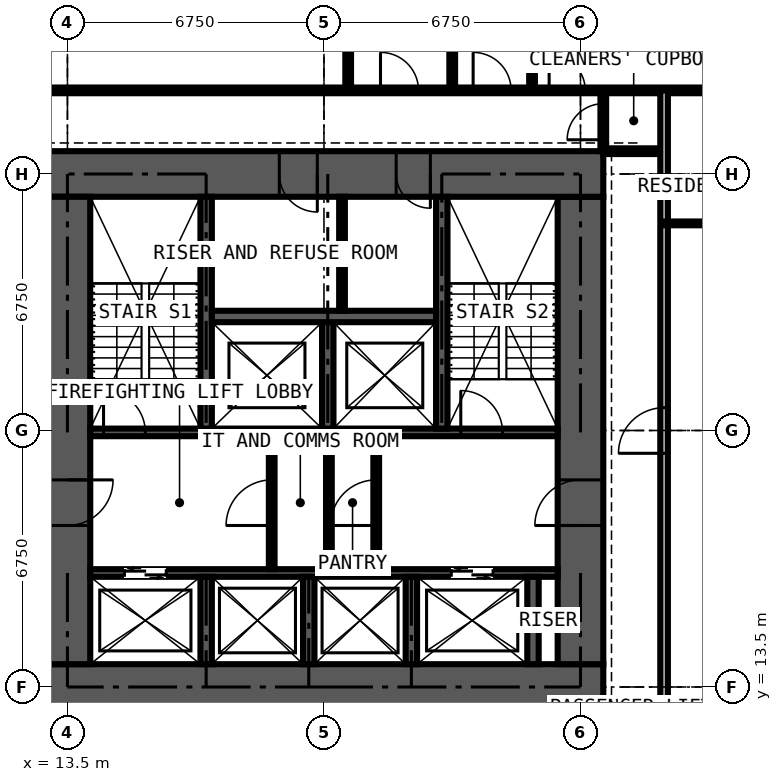
"""IFC4 building model, lengths in metres.
Left out: names, types, materials, properties, quantities, classifications, styles, units other than length and angle.
Written with IfcOpenShell. Run it as: python <this file> out.ifc"""

import sys

from ifc_helpers import new_model, si_unit, direction, frame, frame_2d, origin, place, context, subcontext, project, spatial, rectangle, extrude, element, fill, save


model = new_model("IFC4")
c1 = context("Model", 3, precision=1e-05, world=origin(), true_north=direction((0.0, 1.0)))
c2 = subcontext(c1, "Body", "Model", "MODEL_VIEW")
j1 = project(units=[si_unit("LENGTHUNIT", "METRE"), si_unit("PLANEANGLEUNIT", "RADIAN")], contexts=[c1])
p1 = place(None, origin())
s1 = spatial("IfcSite", under=j1, at=p1, CompositionType="ELEMENT")
p2 = place(p1, origin())
s2 = spatial("IfcBuilding", under=s1, at=p2, CompositionType="ELEMENT")
p3 = place(p2, frame((0.0, 0.0, 21.6)))
s3 = spatial("IfcBuildingStorey", under=s2, at=p3, CompositionType="ELEMENT", Elevation=21.6)
p4 = place(p3, frame((12.9, 13.5, 0.0), z_axis=(0.0, 0.0, 1.0), x_axis=(1.0, 0.0, 0.0)))
e1 = element("IfcWall", 1, at=p4, inside=s3, PredefinedType="SHEAR", context=c2, shape_type="SweptSolid", body=[
    extrude(rectangle(XDim=14.7, YDim=1.2, at=frame_2d((7.35, 0.0))), origin(), (0.0, 0.0, 1.0), 3.6),
])
p5 = place(p3, frame((27.0, 14.1, 0.0), z_axis=(0.0, 0.0, 1.0), x_axis=(0.0, 1.0, 0.0)))
e2 = element("IfcWall", 2, at=p5, inside=s3, PredefinedType="SHEAR", context=c2, shape_type="SweptSolid", body=[
    extrude(rectangle(XDim=12.3, YDim=1.2, at=frame_2d((6.15, 0.0))), origin(), (0.0, 0.0, 1.0), 3.6),
])
p6 = place(p5, frame((3.65, 0.0, 0.0)))
e3 = element("IfcOpeningElement", 3, at=p6, cuts=e2, PredefinedType="OPENING", context=c2, shape_type="SweptSolid", body=[
    extrude(rectangle(XDim=1.2, YDim=2.2, at=frame_2d((0.6, 1.1))), frame((0.0, 0.61, 0.0), z_axis=(0.0, -1.0, 0.0), x_axis=(1.0, 0.0, 0.0)), (0.0, 0.0, 1.0), 1.22),
])
p7 = place(p3, frame((27.6, 27.0, 0.0), z_axis=(0.0, 0.0, 1.0), x_axis=(-1.0, 0.0, 0.0)))
e4 = element("IfcWall", 4, at=p7, inside=s3, PredefinedType="SHEAR", context=c2, shape_type="SweptSolid", body=[
    extrude(rectangle(XDim=14.7, YDim=1.2, at=frame_2d((7.35, 0.0))), origin(), (0.0, 0.0, 1.0), 3.6),
])
p8 = place(p7, frame((4.55, 0.0, 0.0)))
e5 = element("IfcOpeningElement", 5, at=p8, cuts=e4, PredefinedType="OPENING", context=c2, shape_type="SweptSolid", body=[
    extrude(rectangle(XDim=0.9, YDim=2.2, at=frame_2d((0.45, 1.1))), frame((0.0, 0.61, 0.0), z_axis=(0.0, -1.0, 0.0), x_axis=(1.0, 0.0, 0.0)), (0.0, 0.0, 1.0), 1.22),
])
p9 = place(p7, frame((7.525, 0.0, 0.0)))
e6 = element("IfcOpeningElement", 6, at=p9, cuts=e4, PredefinedType="OPENING", context=c2, shape_type="SweptSolid", body=[
    extrude(rectangle(XDim=1.0, YDim=2.2, at=frame_2d((0.5, 1.1))), frame((0.0, 0.61, 0.0), z_axis=(0.0, -1.0, 0.0), x_axis=(1.0, 0.0, 0.0)), (0.0, 0.0, 1.0), 1.22),
])
p10 = place(p3, frame((13.5, 26.4, 0.0), z_axis=(0.0, 0.0, 1.0), x_axis=(0.0, -1.0, 0.0)))
e7 = element("IfcWall", 7, at=p10, inside=s3, PredefinedType="SHEAR", context=c2, shape_type="SweptSolid", body=[
    extrude(rectangle(XDim=12.3, YDim=1.2, at=frame_2d((6.15, 0.0))), origin(), (0.0, 0.0, 1.0), 3.6),
])
p11 = place(p10, frame((7.45, 0.0, 0.0)))
e8 = element("IfcOpeningElement", 8, at=p11, cuts=e7, PredefinedType="OPENING", context=c2, shape_type="SweptSolid", body=[
    extrude(rectangle(XDim=1.2, YDim=2.2, at=frame_2d((0.6, 1.1))), frame((0.0, 0.61, 0.0), z_axis=(0.0, -1.0, 0.0), x_axis=(1.0, 0.0, 0.0)), (0.0, 0.0, 1.0), 1.22),
])
p12 = place(p3, frame((14.1, 16.5, 0.0), z_axis=(0.0, 0.0, 1.0), x_axis=(1.0, 0.0, 0.0)))
e9 = element("IfcWall", 9, at=p12, inside=s3, PredefinedType="SHEAR", context=c2, shape_type="SweptSolid", body=[
    extrude(rectangle(XDim=12.3, YDim=0.2, at=frame_2d((6.15, 0.0))), origin(), (0.0, 0.0, 1.0), 3.6),
])
p13 = place(p12, frame((0.9, 0.0, 0.0)))
e10 = element("IfcOpeningElement", 10, at=p13, cuts=e9, PredefinedType="OPENING", context=c2, shape_type="SweptSolid", body=[
    extrude(rectangle(XDim=1.1, YDim=2.2, at=frame_2d((0.55, 1.1))), frame((0.0, 0.11, 0.0), z_axis=(0.0, -1.0, 0.0), x_axis=(1.0, 0.0, 0.0)), (0.0, 0.0, 1.0), 0.22),
])
p14 = place(p12, frame((9.5, 0.0, 0.0)))
e11 = element("IfcOpeningElement", 11, at=p14, cuts=e9, PredefinedType="OPENING", context=c2, shape_type="SweptSolid", body=[
    extrude(rectangle(XDim=1.1, YDim=2.2, at=frame_2d((0.55, 1.1))), frame((0.0, 0.11, 0.0), z_axis=(0.0, -1.0, 0.0), x_axis=(1.0, 0.0, 0.0)), (0.0, 0.0, 1.0), 0.22),
])
p15 = place(p3, frame((14.1, 20.2, 0.0), z_axis=(0.0, 0.0, 1.0), x_axis=(1.0, 0.0, 0.0)))
e12 = element("IfcWall", 12, at=p15, inside=s3, PredefinedType="SHEAR", context=c2, shape_type="SweptSolid", body=[
    extrude(rectangle(XDim=12.3, YDim=0.2, at=frame_2d((6.15, 0.0))), origin(), (0.0, 0.0, 1.0), 3.6),
])
p16 = place(p15, frame((0.35, 0.0, 0.0)))
e13 = element("IfcOpeningElement", 13, at=p16, cuts=e12, PredefinedType="OPENING", context=c2, shape_type="SweptSolid", body=[
    extrude(rectangle(XDim=1.1, YDim=2.2, at=frame_2d((0.55, 1.1))), frame((0.0, 0.11, 0.0), z_axis=(0.0, -1.0, 0.0), x_axis=(1.0, 0.0, 0.0)), (0.0, 0.0, 1.0), 0.22),
])
p17 = place(p15, frame((9.75, 0.0, 0.0)))
e14 = element("IfcOpeningElement", 14, at=p17, cuts=e12, PredefinedType="OPENING", context=c2, shape_type="SweptSolid", body=[
    extrude(rectangle(XDim=1.1, YDim=2.2, at=frame_2d((0.55, 1.1))), frame((0.0, 0.11, 0.0), z_axis=(0.0, -1.0, 0.0), x_axis=(1.0, 0.0, 0.0)), (0.0, 0.0, 1.0), 0.22),
])
for number, where, z_axis, x_axis in (
    (15, (17.15, 20.3, 0.0), (0.0, 0.0, 1.0), (0.0, 1.0, 0.0)),
    (16, (23.35, 20.3, 0.0), (0.0, 0.0, 1.0), (0.0, 1.0, 0.0)),
):
    element("IfcWall", number, at=place(p3, frame(where, z_axis=z_axis, x_axis=x_axis)), inside=s3, PredefinedType="SHEAR", context=c2, shape_type="SweptSolid", body=[
        extrude(rectangle(XDim=6.1, YDim=0.3, at=frame_2d((3.05, 0.0))), origin(), (0.0, 0.0, 1.0), 3.6),
    ])
p18 = place(p3, frame((20.35, 20.3, 0.0), z_axis=(0.0, 0.0, 1.0), x_axis=(0.0, 1.0, 0.0)))
e17 = element("IfcWall", 17, at=p18, inside=s3, PredefinedType="SHEAR", context=c2, shape_type="SweptSolid", body=[
    extrude(rectangle(XDim=2.8, YDim=0.3, at=frame_2d((1.4, 0.0))), origin(), (0.0, 0.0, 1.0), 3.6),
])
p19 = place(p3, frame((17.3, 23.25, 0.0), z_axis=(0.0, 0.0, 1.0), x_axis=(1.0, 0.0, 0.0)))
e18 = element("IfcWall", 18, at=p19, inside=s3, PredefinedType="SHEAR", context=c2, shape_type="SweptSolid", body=[
    extrude(rectangle(XDim=5.9, YDim=0.3, at=frame_2d((2.95, 0.0))), origin(), (0.0, 0.0, 1.0), 3.6),
])
for number, where, z_axis, x_axis in (
    (19, (17.15, 14.1, 0.0), (0.0, 0.0, 1.0), (0.0, 1.0, 0.0)),
    (20, (19.85, 14.1, 0.0), (0.0, 0.0, 1.0), (0.0, 1.0, 0.0)),
    (21, (22.55, 14.1, 0.0), (0.0, 0.0, 1.0), (0.0, 1.0, 0.0)),
    (22, (25.75, 14.1, 0.0), (0.0, 0.0, 1.0), (0.0, 1.0, 0.0)),
):
    element("IfcWall", number, at=place(p3, frame(where, z_axis=z_axis, x_axis=x_axis)), inside=s3, PredefinedType="SHEAR", context=c2, shape_type="SweptSolid", body=[
        extrude(rectangle(XDim=2.3, YDim=0.3, at=frame_2d((1.15, 0.0))), origin(), (0.0, 0.0, 1.0), 3.6),
    ])
p20 = place(p3, frame((18.875, 16.6, 0.0), z_axis=(0.0, 0.0, 1.0), x_axis=(0.0, 1.0, 0.0)))
e23 = element("IfcWall", 23, at=p20, inside=s3, PredefinedType="PARTITIONING", context=c2, shape_type="SweptSolid", body=[
    extrude(rectangle(XDim=3.5, YDim=0.15, at=frame_2d((1.75, 0.0))), origin(), (0.0, 0.0, 1.0), 3.375),
])
p21 = place(p20, frame((1.15, 0.0, 0.0)))
e24 = element("IfcOpeningElement", 24, at=p21, cuts=e23, PredefinedType="OPENING", context=c2, shape_type="SweptSolid", body=[
    extrude(rectangle(XDim=1.2, YDim=2.2, at=frame_2d((0.6, 1.1))), frame((0.0, 0.085, 0.0), z_axis=(0.0, -1.0, 0.0), x_axis=(1.0, 0.0, 0.0)), (0.0, 0.0, 1.0), 0.17),
])
p22 = place(p3, frame((21.625, 16.6, 0.0), z_axis=(0.0, 0.0, 1.0), x_axis=(0.0, 1.0, 0.0)))
e25 = element("IfcWall", 25, at=p22, inside=s3, PredefinedType="PARTITIONING", context=c2, shape_type="SweptSolid", body=[
    extrude(rectangle(XDim=3.5, YDim=0.15, at=frame_2d((1.75, 0.0))), origin(), (0.0, 0.0, 1.0), 3.375),
])
p23 = place(p22, frame((1.15, 0.0, 0.0)))
e26 = element("IfcOpeningElement", 26, at=p23, cuts=e25, PredefinedType="OPENING", context=c2, shape_type="SweptSolid", body=[
    extrude(rectangle(XDim=1.2, YDim=2.2, at=frame_2d((0.6, 1.1))), frame((0.0, 0.085, 0.0), z_axis=(0.0, -1.0, 0.0), x_axis=(1.0, 0.0, 0.0)), (0.0, 0.0, 1.0), 0.17),
])
p24 = place(p3, frame((20.38, 16.6, 0.0), z_axis=(0.0, 0.0, 1.0), x_axis=(0.0, 1.0, 0.0)))
e27 = element("IfcWall", 27, at=p24, inside=s3, PredefinedType="PARTITIONING", context=c2, shape_type="SweptSolid", body=[
    extrude(rectangle(XDim=3.5, YDim=0.15, at=frame_2d((1.75, 0.0))), origin(), (0.0, 0.0, 1.0), 3.375),
])
p25 = place(p3, frame((20.725, 23.4, 0.0), z_axis=(0.0, 0.0, 1.0), x_axis=(0.0, 1.0, 0.0)))
e28 = element("IfcWall", 28, at=p25, inside=s3, PredefinedType="PARTITIONING", context=c2, shape_type="SweptSolid", body=[
    extrude(rectangle(XDim=3.0, YDim=0.15, at=frame_2d((1.5, 0.0))), origin(), (0.0, 0.0, 1.0), 3.375),
])
p26 = place(p3, frame((11.3, 29.2, 0.0), z_axis=(0.0, 0.0, 1.0), x_axis=(1.0, 0.0, 0.0)))
e29 = element("IfcWall", 29, at=p26, inside=s3, PredefinedType="PARTITIONING", context=c2, shape_type="SweptSolid", body=[
    extrude(rectangle(XDim=19.075, YDim=0.15, at=frame_2d((9.538, 0.0))), origin(), (0.0, 0.0, 1.0), 3.375),
])
p27 = place(p26, frame((12.875, 0.0, 0.0)))
e30 = element("IfcOpeningElement", 30, at=p27, cuts=e29, PredefinedType="OPENING", context=c2, shape_type="SweptSolid", body=[
    extrude(rectangle(XDim=1.0, YDim=2.2, at=frame_2d((0.5, 1.1))), frame((0.0, 0.085, 0.0), z_axis=(0.0, -1.0, 0.0), x_axis=(1.0, 0.0, 0.0)), (0.0, 0.0, 1.0), 0.17),
])
p28 = place(p26, frame((10.438, 0.0, 0.0)))
e31 = element("IfcOpeningElement", 31, at=p28, cuts=e29, PredefinedType="OPENING", context=c2, shape_type="SweptSolid", body=[
    extrude(rectangle(XDim=1.0, YDim=2.2, at=frame_2d((0.5, 1.1))), frame((0.0, 0.085, 0.0), z_axis=(0.0, -1.0, 0.0), x_axis=(1.0, 0.0, 0.0)), (0.0, 0.0, 1.0), 0.17),
])
p29 = place(p26, frame((14.875, 0.0, 0.0)))
e32 = element("IfcOpeningElement", 32, at=p29, cuts=e29, PredefinedType="OPENING", context=c2, shape_type="SweptSolid", body=[
    extrude(rectangle(XDim=0.95, YDim=2.2, at=frame_2d((0.475, 1.1))), frame((0.0, 0.085, 0.0), z_axis=(0.0, -1.0, 0.0), x_axis=(1.0, 0.0, 0.0)), (0.0, 0.0, 1.0), 0.17),
])
p30 = place(p3, frame((20.887, 29.2, 0.0), z_axis=(0.0, 0.0, 1.0), x_axis=(0.0, 1.0, 0.0)))
e33 = element("IfcWall", 33, at=p30, inside=s3, PredefinedType="PARTITIONING", context=c2, shape_type="SweptSolid", body=[
    extrude(rectangle(XDim=5.65, YDim=0.15, at=frame_2d((2.825, 0.0))), origin(), (0.0, 0.0, 1.0), 3.375),
])
p31 = place(p3, frame((23.625, 29.2, 0.0), z_axis=(0.0, 0.0, 1.0), x_axis=(0.0, 1.0, 0.0)))
e34 = element("IfcWall", 34, at=p31, inside=s3, PredefinedType="PARTITIONING", context=c2, shape_type="SweptSolid", body=[
    extrude(rectangle(XDim=12.034, YDim=0.15, at=frame_2d((6.017, 0.0))), origin(), (0.0, 0.0, 1.0), 3.375),
])
p32 = place(p3, frame((25.725, 29.2, 0.0), z_axis=(0.0, 0.0, 1.0), x_axis=(0.0, 1.0, 0.0)))
e35 = element("IfcWall", 35, at=p32, inside=s3, PredefinedType="PARTITIONING", context=c2, shape_type="SweptSolid", body=[
    extrude(rectangle(XDim=5.65, YDim=0.15, at=frame_2d((2.825, 0.0))), origin(), (0.0, 0.0, 1.0), 3.375),
])
p33 = place(p3, frame((27.6, 27.6, 0.0), z_axis=(0.0, 0.0, 1.0), x_axis=(0.0, 1.0, 0.0)))
e36 = element("IfcWall", 36, at=p33, inside=s3, PredefinedType="PARTITIONING", context=c2, shape_type="SweptSolid", body=[
    extrude(rectangle(XDim=1.6, YDim=0.15, at=frame_2d((0.8, 0.0))), origin(), (0.0, 0.0, 1.0), 3.375),
])
p34 = place(p33, frame((0.3, 0.0, 0.0)))
e37 = element("IfcOpeningElement", 37, at=p34, cuts=e36, PredefinedType="OPENING", context=c2, shape_type="SweptSolid", body=[
    extrude(rectangle(XDim=0.95, YDim=2.2, at=frame_2d((0.475, 1.1))), frame((0.0, 0.085, 0.0), z_axis=(0.0, -1.0, 0.0), x_axis=(1.0, 0.0, 0.0)), (0.0, 0.0, 1.0), 0.17),
])
p35 = place(p3, frame((27.6, 27.6, 0.0), z_axis=(0.0, 0.0, 1.0), x_axis=(1.0, 0.0, 0.0)))
e38 = element("IfcWall", 38, at=p35, inside=s3, PredefinedType="PARTITIONING", context=c2, shape_type="SweptSolid", body=[
    extrude(rectangle(XDim=1.6, YDim=0.15, at=frame_2d((0.8, 0.0))), origin(), (0.0, 0.0, 1.0), 2.877),
])
p36 = place(p3, frame((29.2, 11.3, 0.0), z_axis=(0.0, 0.0, 1.0), x_axis=(0.0, 1.0, 0.0)))
e39 = element("IfcWall", 39, at=p36, inside=s3, PredefinedType="PARTITIONING", context=c2, shape_type="SweptSolid", body=[
    extrude(rectangle(XDim=17.9, YDim=0.2, at=frame_2d((8.95, 0.0))), origin(), (0.0, 0.0, 1.0), 3.375),
])
p37 = place(p36, frame((8.35, 0.0, 0.0)))
e40 = element("IfcOpeningElement", 40, at=p37, cuts=e39, PredefinedType="OPENING", context=c2, shape_type="SweptSolid", body=[
    extrude(rectangle(XDim=1.2, YDim=2.2, at=frame_2d((0.6, 1.1))), frame((0.0, 0.11, 0.0), z_axis=(0.0, -1.0, 0.0), x_axis=(1.0, 0.0, 0.0)), (0.0, 0.0, 1.0), 0.22),
])
p38 = place(p3, frame((29.2, 25.7, 0.0), z_axis=(0.0, 0.0, 1.0), x_axis=(1.0, 0.0, 0.0)))
e41 = element("IfcWall", 41, at=p38, inside=s3, PredefinedType="SHEAR", context=c2, shape_type="SweptSolid", body=[
    extrude(rectangle(XDim=3.45, YDim=0.1, at=frame_2d((1.725, 0.0))), origin(), (0.0, 0.0, 1.0), 3.375),
])
p39 = place(p13, origin())
e42 = element("IfcDoor", 42, at=p39, inside=s3, OperationType="DOUBLE_DOOR_SLIDING", PredefinedType="DOOR", context=c2, shape_type="SweptSolid", body=[
    extrude(rectangle(XDim=1.1, YDim=2.2, at=frame_2d((0.55, 1.1))), frame((0.0, 0.025, 0.0), z_axis=(0.0, -1.0, 0.0), x_axis=(1.0, 0.0, 0.0)), (0.0, 0.0, 1.0), 0.05),
])
fill(e10, e42)
p40 = place(p14, origin())
e43 = element("IfcDoor", 43, at=p40, inside=s3, OperationType="DOUBLE_DOOR_SLIDING", PredefinedType="DOOR", context=c2, shape_type="SweptSolid", body=[
    extrude(rectangle(XDim=1.1, YDim=2.2, at=frame_2d((0.55, 1.1))), frame((0.0, 0.025, 0.0), z_axis=(0.0, -1.0, 0.0), x_axis=(1.0, 0.0, 0.0)), (0.0, 0.0, 1.0), 0.05),
])
fill(e11, e43)
p41 = place(p11, origin())
e44 = element("IfcDoor", 44, at=p41, inside=s3, OperationType="DOUBLE_DOOR_SINGLE_SWING", PredefinedType="DOOR", context=c2, shape_type="SweptSolid", body=[
    extrude(rectangle(XDim=1.2, YDim=2.2, at=frame_2d((0.6, 1.1))), frame((0.0, 0.025, 0.0), z_axis=(0.0, -1.0, 0.0), x_axis=(1.0, 0.0, 0.0)), (0.0, 0.0, 1.0), 0.05),
])
fill(e8, e44)
p42 = place(p6, origin())
e45 = element("IfcDoor", 45, at=p42, inside=s3, OperationType="DOUBLE_DOOR_SINGLE_SWING", PredefinedType="DOOR", context=c2, shape_type="SweptSolid", body=[
    extrude(rectangle(XDim=1.2, YDim=2.2, at=frame_2d((0.6, 1.1))), frame((0.0, 0.025, 0.0), z_axis=(0.0, -1.0, 0.0), x_axis=(1.0, 0.0, 0.0)), (0.0, 0.0, 1.0), 0.05),
])
fill(e3, e45)
p43 = place(p21, origin())
e46 = element("IfcDoor", 46, at=p43, inside=s3, OperationType="DOUBLE_DOOR_SINGLE_SWING", PredefinedType="DOOR", context=c2, shape_type="SweptSolid", body=[
    extrude(rectangle(XDim=1.2, YDim=2.2, at=frame_2d((0.6, 1.1))), frame((0.0, 0.025, 0.0), z_axis=(0.0, -1.0, 0.0), x_axis=(1.0, 0.0, 0.0)), (0.0, 0.0, 1.0), 0.05),
])
fill(e24, e46)
p44 = place(p23, origin())
e47 = element("IfcDoor", 47, at=p44, inside=s3, OperationType="DOUBLE_DOOR_SINGLE_SWING", PredefinedType="DOOR", context=c2, shape_type="SweptSolid", body=[
    extrude(rectangle(XDim=1.2, YDim=2.2, at=frame_2d((0.6, 1.1))), frame((0.0, 0.025, 0.0), z_axis=(0.0, -1.0, 0.0), x_axis=(1.0, 0.0, 0.0)), (0.0, 0.0, 1.0), 0.05),
])
fill(e26, e47)
p45 = place(p8, origin())
e48 = element("IfcDoor", 48, at=p45, inside=s3, OperationType="SINGLE_SWING_LEFT", PredefinedType="DOOR", context=c2, shape_type="SweptSolid", body=[
    extrude(rectangle(XDim=0.9, YDim=2.2, at=frame_2d((0.45, 1.1))), frame((0.0, 0.4, 0.0), z_axis=(0.0, -1.0, 0.0), x_axis=(1.0, 0.0, 0.0)), (0.0, 0.0, 1.0), 0.8),
])
fill(e5, e48)
p46 = place(p9, origin())
e49 = element("IfcDoor", 49, at=p46, inside=s3, OperationType="SINGLE_SWING_LEFT", PredefinedType="DOOR", context=c2, shape_type="SweptSolid", body=[
    extrude(rectangle(XDim=1.0, YDim=2.2, at=frame_2d((0.5, 1.1))), frame((0.0, 0.025, 0.0), z_axis=(0.0, -1.0, 0.0), x_axis=(1.0, 0.0, 0.0)), (0.0, 0.0, 1.0), 0.05),
])
fill(e6, e49)
p47 = place(p16, origin())
e50 = element("IfcDoor", 50, at=p47, inside=s3, OperationType="SINGLE_SWING_LEFT", PredefinedType="DOOR", context=c2, shape_type="SweptSolid", body=[
    extrude(rectangle(XDim=1.1, YDim=2.2, at=frame_2d((0.55, 1.1))), frame((0.0, 0.025, 0.0), z_axis=(0.0, -1.0, 0.0), x_axis=(1.0, 0.0, 0.0)), (0.0, 0.0, 1.0), 0.05),
])
fill(e13, e50)
p48 = place(p17, origin())
e51 = element("IfcDoor", 51, at=p48, inside=s3, OperationType="SINGLE_SWING_LEFT", PredefinedType="DOOR", context=c2, shape_type="SweptSolid", body=[
    extrude(rectangle(XDim=1.1, YDim=2.2, at=frame_2d((0.55, 1.1))), frame((0.0, 0.025, 0.0), z_axis=(0.0, -1.0, 0.0), x_axis=(1.0, 0.0, 0.0)), (0.0, 0.0, 1.0), 0.05),
])
fill(e14, e51)
p49 = place(p34, origin())
e52 = element("IfcDoor", 52, at=p49, inside=s3, OperationType="SINGLE_SWING_LEFT", PredefinedType="DOOR", context=c2, shape_type="SweptSolid", body=[
    extrude(rectangle(XDim=0.95, YDim=2.2, at=frame_2d((0.475, 1.1))), frame((0.0, 0.025, 0.0), z_axis=(0.0, -1.0, 0.0), x_axis=(1.0, 0.0, 0.0)), (0.0, 0.0, 1.0), 0.05),
])
fill(e37, e52)
p50 = place(p27, origin())
e53 = element("IfcDoor", 53, at=p50, inside=s3, OperationType="SINGLE_SWING_LEFT", PredefinedType="DOOR", context=c2, shape_type="SweptSolid", body=[
    extrude(rectangle(XDim=1.0, YDim=2.2, at=frame_2d((0.5, 1.1))), frame((0.0, 0.025, 0.0), z_axis=(0.0, -1.0, 0.0), x_axis=(1.0, 0.0, 0.0)), (0.0, 0.0, 1.0), 0.05),
])
fill(e30, e53)
p51 = place(p28, origin())
e54 = element("IfcDoor", 54, at=p51, inside=s3, OperationType="SINGLE_SWING_LEFT", PredefinedType="DOOR", context=c2, shape_type="SweptSolid", body=[
    extrude(rectangle(XDim=1.0, YDim=2.2, at=frame_2d((0.5, 1.1))), frame((0.0, 0.025, 0.0), z_axis=(0.0, -1.0, 0.0), x_axis=(1.0, 0.0, 0.0)), (0.0, 0.0, 1.0), 0.05),
])
fill(e31, e54)
p52 = place(p29, origin())
e55 = element("IfcDoor", 55, at=p52, inside=s3, OperationType="SINGLE_SWING_LEFT", PredefinedType="DOOR", context=c2, shape_type="SweptSolid", body=[
    extrude(rectangle(XDim=0.95, YDim=2.2, at=frame_2d((0.475, 1.1))), frame((0.0, 0.025, 0.0), z_axis=(0.0, -1.0, 0.0), x_axis=(1.0, 0.0, 0.0)), (0.0, 0.0, 1.0), 0.05),
])
fill(e32, e55)
p53 = place(p37, origin())
e56 = element("IfcDoor", 56, at=p53, inside=s3, OperationType="DOUBLE_DOOR_SINGLE_SWING", PredefinedType="DOOR", context=c2, shape_type="SweptSolid", body=[
    extrude(rectangle(XDim=1.2, YDim=2.2, at=frame_2d((0.6, 1.1))), frame((0.0, 0.025, 0.0), z_axis=(0.0, -1.0, 0.0), x_axis=(1.0, 0.0, 0.0)), (0.0, 0.0, 1.0), 0.05),
])
fill(e40, e56)
save(model, sys.argv[1])
